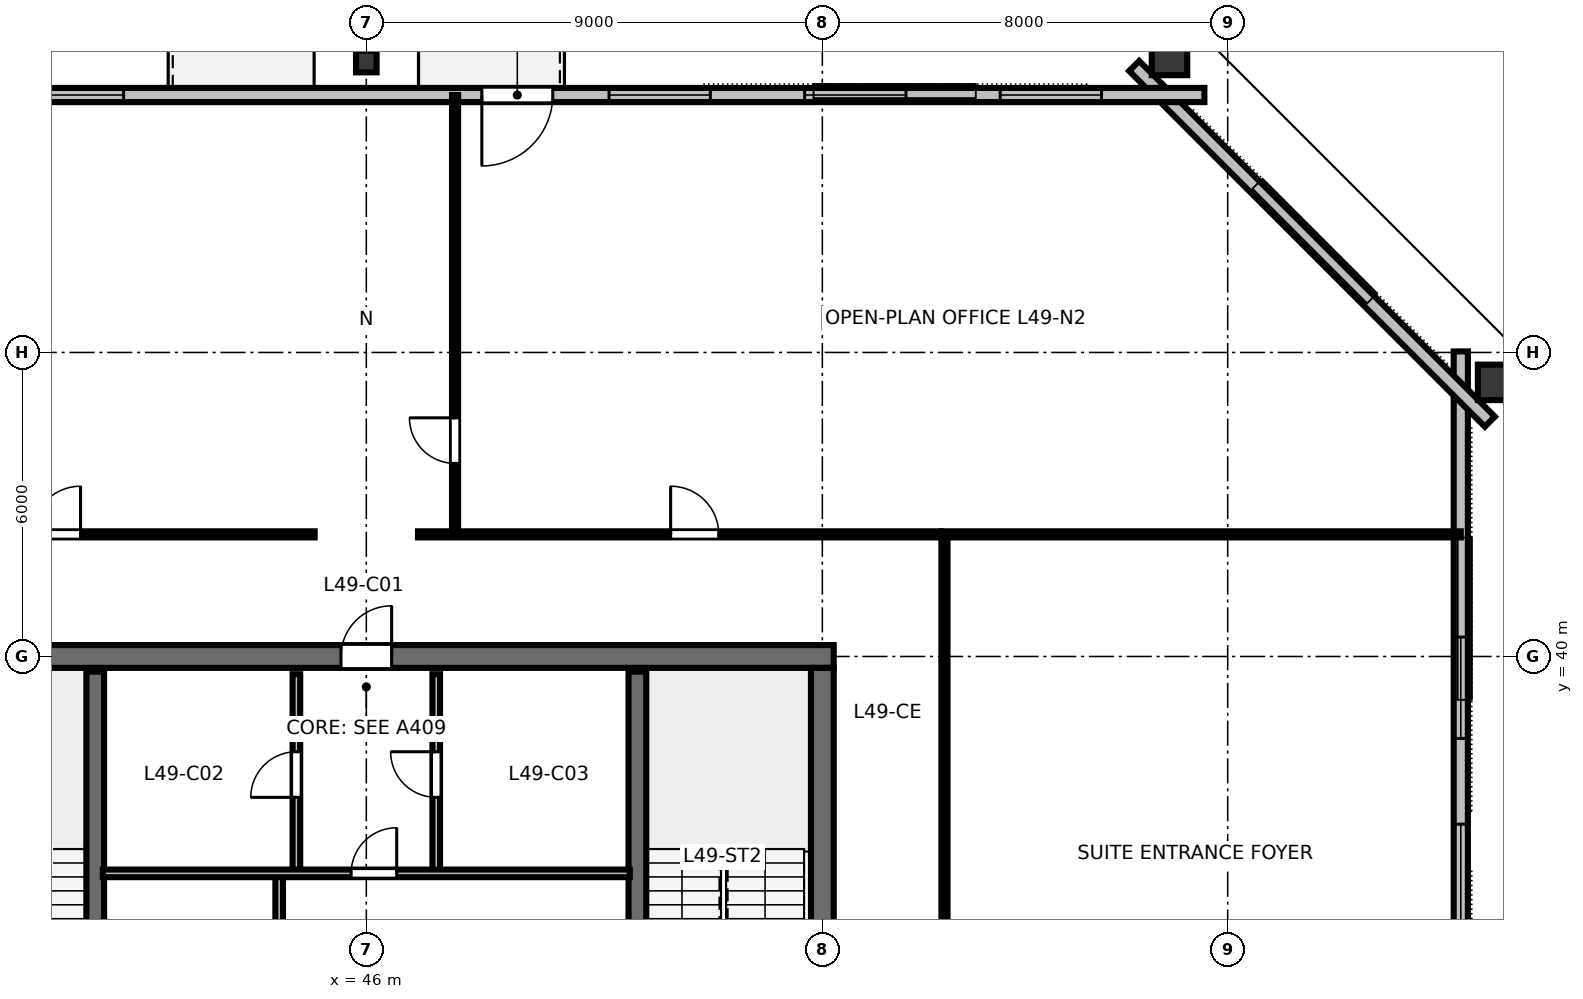
"""IFC4 building model, lengths in metres.
Left out: names, types, materials, properties, quantities, classifications, styles, units other than length and angle.
Written with IfcOpenShell. Run it as: python <this file> out.ifc"""

import sys

from ifc_helpers import new_model, si_unit, direction, frame, frame_2d, origin, origin_2d, place, context, subcontext, project, spatial, rectangle, hollow_rectangle, i_section, extrude, element, fill, save


model = new_model("IFC4")
c1 = context("Model", 3, precision=1e-05, world=origin(), true_north=direction((0.0, 1.0)))
c2 = subcontext(c1, "Body", "Model", "MODEL_VIEW")
j1 = project(units=[si_unit("LENGTHUNIT", "METRE"), si_unit("PLANEANGLEUNIT", "RADIAN")], contexts=[c1])
p1 = place(None, origin())
s1 = spatial("IfcSite", under=j1, at=p1, CompositionType="ELEMENT")
p2 = place(p1, origin())
s2 = spatial("IfcBuilding", under=s1, at=p2, CompositionType="ELEMENT")
p3 = place(p2, frame((0.0, 0.0, 187.8)))
s3 = spatial("IfcBuildingStorey", under=s2, at=p3, CompositionType="ELEMENT", Elevation=187.8)
p4 = place(p3, frame((36.775, 40.0, 0.0), z_axis=(0.0, 0.0, 1.0), x_axis=(1.0, 0.0, 0.0)))
e1 = element("IfcWall", 1, at=p4, inside=s3, PredefinedType="SHEAR", context=c2, shape_type="SweptSolid", body=[
    extrude(rectangle(XDim=18.45, YDim=0.45, at=frame_2d((9.225, 0.0))), origin(), (0.0, 0.0, 1.0), 3.36),
])
p5 = place(p4, frame((8.725, 0.0, 0.0)))
e2 = element("IfcOpeningElement", 2, at=p5, cuts=e1, PredefinedType="OPENING", context=c2, shape_type="SweptSolid", body=[
    extrude(rectangle(XDim=1.0, YDim=2.15, at=frame_2d((0.5, 1.075))), frame((0.0, 0.235, 0.0), z_axis=(0.0, -1.0, 0.0), x_axis=(1.0, 0.0, 0.0)), (0.0, 0.0, 1.0), 0.47),
])
p6 = place(p3, frame((55.0, 24.225, 0.0), z_axis=(0.0, 0.0, 1.0), x_axis=(0.0, 1.0, 0.0)))
e3 = element("IfcWall", 3, at=p6, inside=s3, PredefinedType="SHEAR", context=c2, shape_type="SweptSolid", body=[
    extrude(rectangle(XDim=15.55, YDim=0.45, at=frame_2d((7.775, 0.0))), origin(), (0.0, 0.0, 1.0), 3.36),
])
p7 = place(p6, frame((5.3, 0.0, 0.0)))
e4 = element("IfcOpeningElement", 4, at=p7, cuts=e3, PredefinedType="OPENING", context=c2, shape_type="SweptSolid", body=[
    extrude(rectangle(XDim=1.15, YDim=2.15, at=frame_2d((0.575, 1.075))), frame((0.0, 0.235, 0.0), z_axis=(0.0, -1.0, 0.0), x_axis=(1.0, 0.0, 0.0)), (0.0, 0.0, 1.0), 0.47),
])
for number, where, z_axis, x_axis in (
    (5, (68.363, 45.41, 0.0), (0.0, 0.0, 1.0), (0.0, 1.0, 0.0)),
    (6, (61.851, 51.897, 0.0), (0.0, 0.0, 1.0), (1.0, 0.0, 0.0)),
):
    element("IfcColumn", number, at=place(p3, frame(where, z_axis=z_axis, x_axis=x_axis)), inside=s3, PredefinedType="COLUMN", context=c2, shape_type="SweptSolid", body=[
        extrude(hollow_rectangle(XDim=0.7, YDim=0.85, WallThickness=0.04, at=origin_2d()), origin(), (0.0, 0.0, 1.0), 3.373),
    ])
p8 = place(p3, frame((46.0, 51.74, 0.0), z_axis=(0.0, 0.0, 1.0), x_axis=(1.0, 0.0, 0.0)))
e7 = element("IfcColumn", 7, at=p8, inside=s3, PredefinedType="COLUMN", context=c2, shape_type="SweptSolid", body=[
    extrude(i_section(OverallWidth=0.406, OverallDepth=0.425, WebThickness=0.033, FlangeThickness=0.052, FilletRadius=0.025, at=origin_2d()), origin(), (0.0, 0.0, 1.0), 3.373),
])
p9 = place(p3, frame((67.6, 17.98, 0.0), z_axis=(0.0, 0.0, 1.0), x_axis=(0.0, 1.0, 0.0)))
e8 = element("IfcWall", 8, at=p9, inside=s3, PredefinedType="STANDARD", context=c2, shape_type="SweptSolid", body=[
    extrude(rectangle(XDim=28.04, YDim=0.28, at=frame_2d((14.02, 0.0))), origin(), (0.0, 0.0, 1.0), 3.375),
])
p10 = place(p9, frame((5.637, 0.0, 0.8)))
e9 = element("IfcOpeningElement", 9, at=p10, cuts=e8, PredefinedType="OPENING", context=c2, shape_type="SweptSolid", body=[
    extrude(rectangle(XDim=2.0, YDim=1.95, at=frame_2d((1.0, 0.975))), frame((0.0, 0.15, 0.0), z_axis=(0.0, -1.0, 0.0), x_axis=(1.0, 0.0, 0.0)), (0.0, 0.0, 1.0), 0.3),
])
p11 = place(p9, frame((9.329, 0.0, 0.8)))
e10 = element("IfcOpeningElement", 10, at=p11, cuts=e8, PredefinedType="OPENING", context=c2, shape_type="SweptSolid", body=[
    extrude(rectangle(XDim=2.0, YDim=1.95, at=frame_2d((1.0, 0.975))), frame((0.0, 0.15, 0.0), z_axis=(0.0, -1.0, 0.0), x_axis=(1.0, 0.0, 0.0)), (0.0, 0.0, 1.0), 0.3),
])
p12 = place(p9, frame((16.711, 0.0, 0.8)))
e11 = element("IfcOpeningElement", 11, at=p12, cuts=e8, PredefinedType="OPENING", context=c2, shape_type="SweptSolid", body=[
    extrude(rectangle(XDim=2.0, YDim=1.95, at=frame_2d((1.0, 0.975))), frame((0.0, 0.15, 0.0), z_axis=(0.0, -1.0, 0.0), x_axis=(1.0, 0.0, 0.0)), (0.0, 0.0, 1.0), 0.3),
])
p13 = place(p9, frame((20.403, 0.0, 0.8)))
e12 = element("IfcOpeningElement", 12, at=p13, cuts=e8, PredefinedType="OPENING", context=c2, shape_type="SweptSolid", body=[
    extrude(rectangle(XDim=2.0, YDim=1.95, at=frame_2d((1.0, 0.975))), frame((0.0, 0.15, 0.0), z_axis=(0.0, -1.0, 0.0), x_axis=(1.0, 0.0, 0.0)), (0.0, 0.0, 1.0), 0.3),
])
p14 = place(p3, frame((68.174, 44.635, 0.0), z_axis=(0.0, 0.0, 1.0), x_axis=(-0.707106781187, 0.707106781187, 0.0)))
e13 = element("IfcWall", 13, at=p14, inside=s3, PredefinedType="STANDARD", context=c2, shape_type="SweptSolid", body=[
    extrude(rectangle(XDim=9.927, YDim=0.28, at=frame_2d((4.963, 0.0))), origin(), (0.0, 0.0, 1.0), 3.375),
])
p15 = place(p3, frame((62.54, 51.08, 0.0), z_axis=(0.0, 0.0, 1.0), x_axis=(-1.0, 0.0, 0.0)))
e14 = element("IfcWall", 14, at=p15, inside=s3, PredefinedType="STANDARD", context=c2, shape_type="SweptSolid", body=[
    extrude(rectangle(XDim=33.08, YDim=0.28, at=frame_2d((16.54, 0.0))), origin(), (0.0, 0.0, 1.0), 3.375),
])
p16 = place(p15, frame((12.86, 0.0, 0.0)))
e15 = element("IfcOpeningElement", 15, at=p16, cuts=e14, PredefinedType="OPENING", context=c2, shape_type="SweptSolid", body=[
    extrude(rectangle(XDim=1.4, YDim=2.15, at=frame_2d((0.7, 1.075))), frame((0.0, 0.15, 0.0), z_axis=(0.0, -1.0, 0.0), x_axis=(1.0, 0.0, 0.0)), (0.0, 0.0, 1.0), 0.3),
])
p17 = place(p15, frame((2.03, 0.0, 0.8)))
e16 = element("IfcOpeningElement", 16, at=p17, cuts=e14, PredefinedType="OPENING", context=c2, shape_type="SweptSolid", body=[
    extrude(rectangle(XDim=2.0, YDim=1.95, at=frame_2d((1.0, 0.975))), frame((0.0, 0.15, 0.0), z_axis=(0.0, -1.0, 0.0), x_axis=(1.0, 0.0, 0.0)), (0.0, 0.0, 1.0), 0.3),
])
p18 = place(p15, frame((5.89, 0.0, 0.8)))
e17 = element("IfcOpeningElement", 17, at=p18, cuts=e14, PredefinedType="OPENING", context=c2, shape_type="SweptSolid", body=[
    extrude(rectangle(XDim=2.0, YDim=1.95, at=frame_2d((1.0, 0.975))), frame((0.0, 0.15, 0.0), z_axis=(0.0, -1.0, 0.0), x_axis=(1.0, 0.0, 0.0)), (0.0, 0.0, 1.0), 0.3),
])
p19 = place(p15, frame((9.75, 0.0, 0.8)))
e18 = element("IfcOpeningElement", 18, at=p19, cuts=e14, PredefinedType="OPENING", context=c2, shape_type="SweptSolid", body=[
    extrude(rectangle(XDim=2.0, YDim=1.95, at=frame_2d((1.0, 0.975))), frame((0.0, 0.15, 0.0), z_axis=(0.0, -1.0, 0.0), x_axis=(1.0, 0.0, 0.0)), (0.0, 0.0, 1.0), 0.3),
])
p20 = place(p15, frame((21.33, 0.0, 0.8)))
e19 = element("IfcOpeningElement", 19, at=p20, cuts=e14, PredefinedType="OPENING", context=c2, shape_type="SweptSolid", body=[
    extrude(rectangle(XDim=2.0, YDim=1.95, at=frame_2d((1.0, 0.975))), frame((0.0, 0.15, 0.0), z_axis=(0.0, -1.0, 0.0), x_axis=(1.0, 0.0, 0.0)), (0.0, 0.0, 1.0), 0.3),
])
p21 = place(p15, frame((25.19, 0.0, 0.8)))
e20 = element("IfcOpeningElement", 20, at=p21, cuts=e14, PredefinedType="OPENING", context=c2, shape_type="SweptSolid", body=[
    extrude(rectangle(XDim=2.0, YDim=1.95, at=frame_2d((1.0, 0.975))), frame((0.0, 0.15, 0.0), z_axis=(0.0, -1.0, 0.0), x_axis=(1.0, 0.0, 0.0)), (0.0, 0.0, 1.0), 0.3),
])
p22 = place(p15, frame((29.05, 0.0, 0.8)))
e21 = element("IfcOpeningElement", 21, at=p22, cuts=e14, PredefinedType="OPENING", context=c2, shape_type="SweptSolid", body=[
    extrude(rectangle(XDim=2.0, YDim=1.95, at=frame_2d((1.0, 0.975))), frame((0.0, 0.15, 0.0), z_axis=(0.0, -1.0, 0.0), x_axis=(1.0, 0.0, 0.0)), (0.0, 0.0, 1.0), 0.3),
])
for number, where, z_axis, x_axis in (
    (22, (40.65, 32.0, 0.0), (0.0, 0.0, 1.0), (0.0, 1.0, 0.0)),
    (23, (51.35, 32.0, 0.0), (0.0, 0.0, 1.0), (0.0, 1.0, 0.0)),
):
    element("IfcWall", number, at=place(p3, frame(where, z_axis=z_axis, x_axis=x_axis)), inside=s3, PredefinedType="SHEAR", context=c2, shape_type="SweptSolid", body=[
        extrude(rectangle(XDim=7.7, YDim=0.35, at=frame_2d((3.85, 0.0))), origin(), (0.0, 0.0, 1.0), 3.6),
    ])
p23 = place(p3, frame((44.62, 35.72, 0.0), z_axis=(0.0, 0.0, 1.0), x_axis=(0.0, 1.0, 0.0)))
e24 = element("IfcWall", 24, at=p23, inside=s3, PredefinedType="PARTITIONING", context=c2, shape_type="SweptSolid", body=[
    extrude(rectangle(XDim=3.93, YDim=0.15, at=frame_2d((1.965, 0.0))), origin(), (0.0, 0.0, 1.0), 3.375),
])
p24 = place(p23, frame((1.5, 0.0, 0.0)))
e25 = element("IfcOpeningElement", 25, at=p24, cuts=e24, PredefinedType="OPENING", context=c2, shape_type="SweptSolid", body=[
    extrude(rectangle(XDim=0.9, YDim=2.15, at=frame_2d((0.45, 1.075))), frame((0.0, 0.085, 0.0), z_axis=(0.0, -1.0, 0.0), x_axis=(1.0, 0.0, 0.0)), (0.0, 0.0, 1.0), 0.17),
])
p25 = place(p3, frame((47.38, 35.72, 0.0), z_axis=(0.0, 0.0, 1.0), x_axis=(0.0, 1.0, 0.0)))
e26 = element("IfcWall", 26, at=p25, inside=s3, PredefinedType="PARTITIONING", context=c2, shape_type="SweptSolid", body=[
    extrude(rectangle(XDim=3.93, YDim=0.15, at=frame_2d((1.965, 0.0))), origin(), (0.0, 0.0, 1.0), 3.375),
])
p26 = place(p25, frame((1.5, 0.0, 0.0)))
e27 = element("IfcOpeningElement", 27, at=p26, cuts=e26, PredefinedType="OPENING", context=c2, shape_type="SweptSolid", body=[
    extrude(rectangle(XDim=0.9, YDim=2.15, at=frame_2d((0.45, 1.075))), frame((0.0, 0.085, 0.0), z_axis=(0.0, -1.0, 0.0), x_axis=(1.0, 0.0, 0.0)), (0.0, 0.0, 1.0), 0.17),
])
p27 = place(p3, frame((44.28, 32.05, 0.0), z_axis=(0.0, 0.0, 1.0), x_axis=(0.0, 1.0, 0.0)))
e28 = element("IfcWall", 28, at=p27, inside=s3, PredefinedType="PARTITIONING", context=c2, shape_type="SweptSolid", body=[
    extrude(rectangle(XDim=3.67, YDim=0.15, at=frame_2d((1.835, 0.0))), origin(), (0.0, 0.0, 1.0), 3.375),
])
p28 = place(p27, frame((1.35, 0.0, 0.0)))
e29 = element("IfcOpeningElement", 29, at=p28, cuts=e28, PredefinedType="OPENING", context=c2, shape_type="SweptSolid", body=[
    extrude(rectangle(XDim=0.92, YDim=2.15, at=frame_2d((0.46, 1.075))), frame((0.0, 0.085, 0.0), z_axis=(0.0, -1.0, 0.0), x_axis=(1.0, 0.0, 0.0)), (0.0, 0.0, 1.0), 0.17),
])
p29 = place(p3, frame((40.8, 35.72, 0.0), z_axis=(0.0, 0.0, 1.0), x_axis=(1.0, 0.0, 0.0)))
e30 = element("IfcWall", 30, at=p29, inside=s3, PredefinedType="PARTITIONING", context=c2, shape_type="SweptSolid", body=[
    extrude(rectangle(XDim=10.4, YDim=0.15, at=frame_2d((5.2, 0.0))), origin(), (0.0, 0.0, 1.0), 3.375),
])
p30 = place(p29, frame((4.9, 0.0, 0.0)))
e31 = element("IfcOpeningElement", 31, at=p30, cuts=e30, PredefinedType="OPENING", context=c2, shape_type="SweptSolid", body=[
    extrude(rectangle(XDim=0.9, YDim=2.15, at=frame_2d((0.45, 1.075))), frame((0.0, 0.085, 0.0), z_axis=(0.0, -1.0, 0.0), x_axis=(1.0, 0.0, 0.0)), (0.0, 0.0, 1.0), 0.17),
])
p31 = place(p3, frame((47.751, 42.41, 0.0), z_axis=(0.0, 0.0, 1.0), x_axis=(0.0, 1.0, 0.0)))
e32 = element("IfcWall", 32, at=p31, inside=s3, PredefinedType="PARTITIONING", context=c2, shape_type="SweptSolid", body=[
    extrude(rectangle(XDim=8.67, YDim=0.12, at=frame_2d((4.335, 0.0))), origin(), (0.0, 0.0, 1.0), 2.655),
])
p32 = place(p31, frame((1.4, 0.0, 0.0)))
e33 = element("IfcOpeningElement", 33, at=p32, cuts=e32, PredefinedType="OPENING", context=c2, shape_type="SweptSolid", body=[
    extrude(rectangle(XDim=0.9, YDim=2.15, at=frame_2d((0.45, 1.075))), frame((0.0, 0.07, 0.0), z_axis=(0.0, -1.0, 0.0), x_axis=(1.0, 0.0, 0.0)), (0.0, 0.0, 1.0), 0.14),
])
p33 = place(p3, frame((34.65, 42.41, 0.0), z_axis=(0.0, 0.0, 1.0), x_axis=(1.0, 0.0, 0.0)))
e34 = element("IfcWall", 34, at=p33, inside=s3, PredefinedType="PARTITIONING", context=c2, shape_type="SweptSolid", body=[
    extrude(rectangle(XDim=10.33, YDim=0.12, at=frame_2d((5.165, 0.0))), origin(), (0.0, 0.0, 1.0), 2.655),
])
p34 = place(p33, frame((4.76, 0.0, 0.0)))
e35 = element("IfcOpeningElement", 35, at=p34, cuts=e34, PredefinedType="OPENING", context=c2, shape_type="SweptSolid", body=[
    extrude(rectangle(XDim=0.95, YDim=2.15, at=frame_2d((0.475, 1.075))), frame((0.0, 0.07, 0.0), z_axis=(0.0, -1.0, 0.0), x_axis=(1.0, 0.0, 0.0)), (0.0, 0.0, 1.0), 0.14),
])
p35 = place(p3, frame((47.02, 42.41, 0.0), z_axis=(0.0, 0.0, 1.0), x_axis=(1.0, 0.0, 0.0)))
e36 = element("IfcWall", 36, at=p35, inside=s3, PredefinedType="PARTITIONING", context=c2, shape_type="SweptSolid", body=[
    extrude(rectangle(XDim=10.33, YDim=0.12, at=frame_2d((5.165, 0.0))), origin(), (0.0, 0.0, 1.0), 2.655),
])
p36 = place(p35, frame((4.986, 0.0, 0.0)))
e37 = element("IfcOpeningElement", 37, at=p36, cuts=e36, PredefinedType="OPENING", context=c2, shape_type="SweptSolid", body=[
    extrude(rectangle(XDim=0.95, YDim=2.15, at=frame_2d((0.475, 1.075))), frame((0.0, 0.07, 0.0), z_axis=(0.0, -1.0, 0.0), x_axis=(1.0, 0.0, 0.0)), (0.0, 0.0, 1.0), 0.14),
])
p37 = place(p3, frame((57.41, 21.65, 0.0), z_axis=(0.0, 0.0, 1.0), x_axis=(0.0, 1.0, 0.0)))
e38 = element("IfcWall", 38, at=p37, inside=s3, PredefinedType="PARTITIONING", context=c2, shape_type="SweptSolid", body=[
    extrude(rectangle(XDim=20.7, YDim=0.12, at=frame_2d((10.35, 0.0))), origin(), (0.0, 0.0, 1.0), 2.655),
])
p38 = place(p37, frame((9.875, 0.0, 0.0)))
e39 = element("IfcOpeningElement", 39, at=p38, cuts=e38, PredefinedType="OPENING", context=c2, shape_type="SweptSolid", body=[
    extrude(rectangle(XDim=0.95, YDim=2.15, at=frame_2d((0.475, 1.075))), frame((0.0, 0.07, 0.0), z_axis=(0.0, -1.0, 0.0), x_axis=(1.0, 0.0, 0.0)), (0.0, 0.0, 1.0), 0.14),
])
p39 = place(p3, frame((57.35, 42.41, 0.0), z_axis=(0.0, 0.0, 1.0), x_axis=(1.0, 0.0, 0.0)))
e40 = element("IfcWall", 40, at=p39, inside=s3, PredefinedType="PARTITIONING", context=c2, shape_type="SweptSolid", body=[
    extrude(rectangle(XDim=10.25, YDim=0.12, at=frame_2d((5.125, 0.0))), origin(), (0.0, 0.0, 1.0), 2.655),
])
p40 = place(p12, origin())
e41 = element("IfcWindow", 41, at=p40, inside=s3, PartitioningType="SINGLE_PANEL", PredefinedType="WINDOW", context=c2, shape_type="SweptSolid", body=[
    extrude(rectangle(XDim=2.0, YDim=1.95, at=frame_2d((1.0, 0.975))), frame((0.0, 0.03, 0.0), z_axis=(0.0, -1.0, 0.0), x_axis=(1.0, 0.0, 0.0)), (0.0, 0.0, 1.0), 0.06),
])
fill(e11, e41)
p41 = place(p13, origin())
e42 = element("IfcWindow", 42, at=p41, inside=s3, PartitioningType="SINGLE_PANEL", PredefinedType="WINDOW", context=c2, shape_type="SweptSolid", body=[
    extrude(rectangle(XDim=2.0, YDim=1.95, at=frame_2d((1.0, 0.975))), frame((0.0, 0.03, 0.0), z_axis=(0.0, -1.0, 0.0), x_axis=(1.0, 0.0, 0.0)), (0.0, 0.0, 1.0), 0.06),
])
fill(e12, e42)
p42 = place(p16, origin())
e43 = element("IfcDoor", 43, at=p42, inside=s3, OperationType="SINGLE_SWING_RIGHT", PredefinedType="DOOR", context=c2, shape_type="SweptSolid", body=[
    extrude(rectangle(XDim=1.4, YDim=2.15, at=frame_2d((0.7, 1.075))), frame((0.0, 0.025, 0.0), z_axis=(0.0, -1.0, 0.0), x_axis=(1.0, 0.0, 0.0)), (0.0, 0.0, 1.0), 0.05),
])
fill(e15, e43)
p43 = place(p17, origin())
e44 = element("IfcWindow", 44, at=p43, inside=s3, PartitioningType="SINGLE_PANEL", PredefinedType="WINDOW", context=c2, shape_type="SweptSolid", body=[
    extrude(rectangle(XDim=2.0, YDim=1.95, at=frame_2d((1.0, 0.975))), frame((0.0, 0.03, 0.0), z_axis=(0.0, -1.0, 0.0), x_axis=(1.0, 0.0, 0.0)), (0.0, 0.0, 1.0), 0.06),
])
fill(e16, e44)
p44 = place(p18, origin())
e45 = element("IfcWindow", 45, at=p44, inside=s3, PartitioningType="SINGLE_PANEL", PredefinedType="WINDOW", context=c2, shape_type="SweptSolid", body=[
    extrude(rectangle(XDim=2.0, YDim=1.95, at=frame_2d((1.0, 0.975))), frame((0.0, 0.03, 0.0), z_axis=(0.0, -1.0, 0.0), x_axis=(1.0, 0.0, 0.0)), (0.0, 0.0, 1.0), 0.06),
])
fill(e17, e45)
p45 = place(p19, origin())
e46 = element("IfcWindow", 46, at=p45, inside=s3, PartitioningType="SINGLE_PANEL", PredefinedType="WINDOW", context=c2, shape_type="SweptSolid", body=[
    extrude(rectangle(XDim=2.0, YDim=1.95, at=frame_2d((1.0, 0.975))), frame((0.0, 0.03, 0.0), z_axis=(0.0, -1.0, 0.0), x_axis=(1.0, 0.0, 0.0)), (0.0, 0.0, 1.0), 0.06),
])
fill(e18, e46)
p46 = place(p20, origin())
e47 = element("IfcWindow", 47, at=p46, inside=s3, PartitioningType="SINGLE_PANEL", PredefinedType="WINDOW", context=c2, shape_type="SweptSolid", body=[
    extrude(rectangle(XDim=2.0, YDim=1.95, at=frame_2d((1.0, 0.975))), frame((0.0, 0.03, 0.0), z_axis=(0.0, -1.0, 0.0), x_axis=(1.0, 0.0, 0.0)), (0.0, 0.0, 1.0), 0.06),
])
fill(e19, e47)
p47 = place(p5, origin())
e48 = element("IfcDoor", 48, at=p47, inside=s3, OperationType="SINGLE_SWING_RIGHT", PredefinedType="DOOR", context=c2, shape_type="SweptSolid", body=[
    extrude(rectangle(XDim=1.0, YDim=2.15, at=frame_2d((0.5, 1.075))), frame((0.0, 0.025, 0.0), z_axis=(0.0, -1.0, 0.0), x_axis=(1.0, 0.0, 0.0)), (0.0, 0.0, 1.0), 0.05),
])
fill(e2, e48)
p48 = place(p24, origin())
e49 = element("IfcDoor", 49, at=p48, inside=s3, OperationType="SINGLE_SWING_LEFT", PredefinedType="DOOR", context=c2, shape_type="SweptSolid", body=[
    extrude(rectangle(XDim=0.9, YDim=2.15, at=frame_2d((0.45, 1.075))), frame((0.0, 0.025, 0.0), z_axis=(0.0, -1.0, 0.0), x_axis=(1.0, 0.0, 0.0)), (0.0, 0.0, 1.0), 0.05),
])
fill(e25, e49)
p49 = place(p26, origin())
e50 = element("IfcDoor", 50, at=p49, inside=s3, OperationType="SINGLE_SWING_RIGHT", PredefinedType="DOOR", context=c2, shape_type="SweptSolid", body=[
    extrude(rectangle(XDim=0.9, YDim=2.15, at=frame_2d((0.45, 1.075))), frame((0.0, 0.025, 0.0), z_axis=(0.0, -1.0, 0.0), x_axis=(1.0, 0.0, 0.0)), (0.0, 0.0, 1.0), 0.05),
])
fill(e27, e50)
p50 = place(p30, origin())
e51 = element("IfcDoor", 51, at=p50, inside=s3, OperationType="SINGLE_SWING_RIGHT", PredefinedType="DOOR", context=c2, shape_type="SweptSolid", body=[
    extrude(rectangle(XDim=0.9, YDim=2.15, at=frame_2d((0.45, 1.075))), frame((0.0, 0.025, 0.0), z_axis=(0.0, -1.0, 0.0), x_axis=(1.0, 0.0, 0.0)), (0.0, 0.0, 1.0), 0.05),
])
fill(e31, e51)
p51 = place(p32, origin())
e52 = element("IfcDoor", 52, at=p51, inside=s3, OperationType="SINGLE_SWING_RIGHT", PredefinedType="DOOR", context=c2, shape_type="SweptSolid", body=[
    extrude(rectangle(XDim=0.9, YDim=2.15, at=frame_2d((0.45, 1.075))), frame((0.0, 0.025, 0.0), z_axis=(0.0, -1.0, 0.0), x_axis=(1.0, 0.0, 0.0)), (0.0, 0.0, 1.0), 0.05),
])
fill(e33, e52)
p52 = place(p34, origin())
e53 = element("IfcDoor", 53, at=p52, inside=s3, OperationType="SINGLE_SWING_RIGHT", PredefinedType="DOOR", context=c2, shape_type="SweptSolid", body=[
    extrude(rectangle(XDim=0.95, YDim=2.15, at=frame_2d((0.475, 1.075))), frame((0.0, 0.025, 0.0), z_axis=(0.0, -1.0, 0.0), x_axis=(1.0, 0.0, 0.0)), (0.0, 0.0, 1.0), 0.05),
])
fill(e35, e53)
p53 = place(p36, origin())
e54 = element("IfcDoor", 54, at=p53, inside=s3, OperationType="SINGLE_SWING_LEFT", PredefinedType="DOOR", context=c2, shape_type="SweptSolid", body=[
    extrude(rectangle(XDim=0.95, YDim=2.15, at=frame_2d((0.475, 1.075))), frame((0.0, 0.025, 0.0), z_axis=(0.0, -1.0, 0.0), x_axis=(1.0, 0.0, 0.0)), (0.0, 0.0, 1.0), 0.05),
])
fill(e37, e54)
save(model, sys.argv[1])
